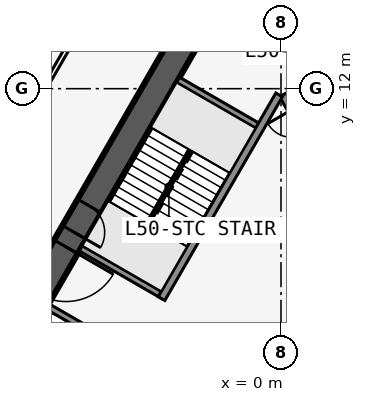
"""IFC4 building model, lengths in metres.
Left out: names, types, materials, properties, quantities, classifications, styles, units other than length and angle.
Written with IfcOpenShell. Run it as: python <this file> out.ifc"""

import sys

from ifc_helpers import new_model, si_unit, direction, frame, frame_2d, origin, place, context, subcontext, project, spatial, rectangle, extrude, element, fill, save


model = new_model("IFC4")
c1 = context("Model", 3, precision=1e-05, world=origin(), true_north=direction((0.0, 1.0)))
c2 = subcontext(c1, "Body", "Model", "MODEL_VIEW")
j1 = project(units=[si_unit("LENGTHUNIT", "METRE"), si_unit("PLANEANGLEUNIT", "RADIAN")], contexts=[c1])
p1 = place(None, origin())
s1 = spatial("IfcSite", under=j1, at=p1, CompositionType="ELEMENT")
p2 = place(p1, origin())
s2 = spatial("IfcBuilding", under=s1, at=p2, CompositionType="ELEMENT")
p3 = place(p2, frame((0.0, 0.0, 186.1)))
s3 = spatial("IfcBuildingStorey", under=s2, at=p3, CompositionType="ELEMENT", Elevation=186.1)
p4 = place(p3, frame((16.5, -9.526, 0.0), z_axis=(0.0, 0.0, 1.0), x_axis=(-0.499999749417, 0.866025548458, 0.0)))
e1 = element("IfcWall", 1, at=p4, inside=s3, PredefinedType="SHEAR", context=c2, shape_type="SweptSolid", body=[
    extrude(rectangle(XDim=33.0, YDim=0.9, at=frame_2d((16.5, 0.0))), origin(), (0.0, 0.0, 1.0), 3.4),
])
p5 = place(p4, frame((14.15, 0.0, 0.0)))
e2 = element("IfcOpeningElement", 2, at=p5, cuts=e1, PredefinedType="OPENING", context=c2, shape_type="SweptSolid", body=[
    extrude(rectangle(XDim=1.8, YDim=2.13, at=frame_2d((0.9, 1.065))), frame((0.0, 0.46, 0.0), z_axis=(0.0, -1.0, 0.0), x_axis=(1.0, 0.0, 0.0)), (0.0, 0.0, 1.0), 0.92),
])
p6 = place(p4, frame((12.6, 0.0, 0.0)))
e3 = element("IfcOpeningElement", 3, at=p6, cuts=e1, PredefinedType="OPENING", context=c2, shape_type="SweptSolid", body=[
    extrude(rectangle(XDim=1.0, YDim=2.13, at=frame_2d((0.5, 1.065))), frame((0.0, 0.46, 0.0), z_axis=(0.0, -1.0, 0.0), x_axis=(1.0, 0.0, 0.0)), (0.0, 0.0, 1.0), 0.92),
])
p7 = place(p3, frame((5.379, 2.586, 0.0), z_axis=(0.0, 0.0, 1.0), x_axis=(-0.500001375892, 0.866024609411, 0.0)))
e4 = element("IfcWall", 4, at=p7, inside=s3, PredefinedType="SOLIDWALL", context=c2, shape_type="SweptSolid", body=[
    extrude(rectangle(XDim=10.633, YDim=0.25, at=frame_2d((5.316, 0.0))), origin(), (0.0, 0.0, 1.0), 3.15),
])
p8 = place(p7, frame((9.164, 0.0, 0.0)))
e5 = element("IfcOpeningElement", 5, at=p8, cuts=e4, PredefinedType="OPENING", context=c2, shape_type="SweptSolid", body=[
    extrude(rectangle(XDim=0.9, YDim=2.13, at=frame_2d((0.45, 1.065))), frame((0.0, 0.135, 0.0), z_axis=(0.0, -1.0, 0.0), x_axis=(1.0, 0.0, 0.0)), (0.0, 0.0, 1.0), 0.27),
])
p9 = place(p7, frame((1.0, 0.0, 0.0)))
e6 = element("IfcOpeningElement", 6, at=p9, cuts=e4, PredefinedType="OPENING", context=c2, shape_type="SweptSolid", body=[
    extrude(rectangle(XDim=1.1, YDim=2.13, at=frame_2d((0.55, 1.065))), frame((0.0, 0.135, 0.0), z_axis=(0.0, -1.0, 0.0), x_axis=(1.0, 0.0, 0.0)), (0.0, 0.0, 1.0), 0.27),
])
p10 = place(p7, frame((3.9, 0.0, 0.0)))
e7 = element("IfcOpeningElement", 7, at=p10, cuts=e4, PredefinedType="OPENING", context=c2, shape_type="SweptSolid", body=[
    extrude(rectangle(XDim=1.1, YDim=2.13, at=frame_2d((0.55, 1.065))), frame((0.0, 0.135, 0.0), z_axis=(0.0, -1.0, 0.0), x_axis=(1.0, 0.0, 0.0)), (0.0, 0.0, 1.0), 0.27),
])
p11 = place(p7, frame((6.8, 0.0, 0.0)))
e8 = element("IfcOpeningElement", 8, at=p11, cuts=e4, PredefinedType="OPENING", context=c2, shape_type="SweptSolid", body=[
    extrude(rectangle(XDim=1.1, YDim=2.13, at=frame_2d((0.55, 1.065))), frame((0.0, 0.135, 0.0), z_axis=(0.0, -1.0, 0.0), x_axis=(1.0, 0.0, 0.0)), (0.0, 0.0, 1.0), 0.27),
])
p12 = place(p3, frame((0.0, 19.052, 0.0), z_axis=(0.0, 0.0, 1.0), x_axis=(-0.499999749417, -0.866025548458, 0.0)))
e9 = element("IfcWall", 9, at=p12, inside=s3, PredefinedType="SHEAR", context=c2, shape_type="SweptSolid", body=[
    extrude(rectangle(XDim=33.0, YDim=0.9, at=frame_2d((16.5, 0.0))), origin(), (0.0, 0.0, 1.0), 3.4),
])
p13 = place(p12, frame((14.15, 0.0, 0.0)))
e10 = element("IfcOpeningElement", 10, at=p13, cuts=e9, PredefinedType="OPENING", context=c2, shape_type="SweptSolid", body=[
    extrude(rectangle(XDim=1.8, YDim=2.13, at=frame_2d((0.9, 1.065))), frame((0.0, 0.46, 0.0), z_axis=(0.0, -1.0, 0.0), x_axis=(1.0, 0.0, 0.0)), (0.0, 0.0, 1.0), 0.92),
])
p14 = place(p12, frame((12.6, 0.0, 0.0)))
e11 = element("IfcOpeningElement", 11, at=p14, cuts=e9, PredefinedType="OPENING", context=c2, shape_type="SweptSolid", body=[
    extrude(rectangle(XDim=1.0, YDim=2.13, at=frame_2d((0.5, 1.065))), frame((0.0, 0.46, 0.0), z_axis=(0.0, -1.0, 0.0), x_axis=(1.0, 0.0, 0.0)), (0.0, 0.0, 1.0), 0.92),
])
p15 = place(p3, frame((-0.062, 11.794, 0.0), z_axis=(0.0, 0.0, 1.0), x_axis=(-0.500006680225, -0.86602154692, 0.0)))
e12 = element("IfcWall", 12, at=p15, inside=s3, PredefinedType="SOLIDWALL", context=c2, shape_type="SweptSolid", body=[
    extrude(rectangle(XDim=7.733, YDim=0.25, at=frame_2d((3.866, 0.0))), origin(), (0.0, 0.0, 1.0), 3.15),
])
for number, where, z_axis, x_axis in (
    (13, (-0.679, 10.727, 0.0), (0.0, 0.0, 1.0), (-0.866, 0.5, 0.0)),
    (14, (-3.879, 5.184, 0.0), (0.0, 0.0, 1.0), (-0.866, 0.5, 0.0)),
    (15, (-4.979, 3.279, 0.0), (0.0, 0.0, 1.0), (-0.866, 0.5, 0.0)),
):
    element("IfcWall", number, at=place(p3, frame(where, z_axis=z_axis, x_axis=x_axis)), inside=s3, PredefinedType="SOLIDWALL", context=c2, shape_type="SweptSolid", body=[
        extrude(rectangle(XDim=3.125, YDim=0.2, at=frame_2d((1.562, 0.0))), origin(), (0.0, 0.0, 1.0), 3.15),
    ])
p16 = place(p3, frame((-0.5, 24.636, 0.0), z_axis=(0.0, 0.0, 1.0), x_axis=(-0.500001915564, -0.86602429783, 0.0)))
e16 = element("IfcWall", 16, at=p16, inside=s3, PredefinedType="PARTITIONING", context=c2, shape_type="SweptSolid", body=[
    extrude(rectangle(XDim=42.172, YDim=0.15, at=frame_2d((21.086, 0.0))), origin(), (0.0, 0.0, 1.0), 3.15),
])
p17 = place(p16, frame((2.338, 0.0, 0.0)))
e17 = element("IfcOpeningElement", 17, at=p17, cuts=e16, PredefinedType="OPENING", context=c2, shape_type="SweptSolid", body=[
    extrude(rectangle(XDim=0.95, YDim=2.13, at=frame_2d((0.475, 1.065))), frame((0.0, 0.085, 0.0), z_axis=(0.0, -1.0, 0.0), x_axis=(1.0, 0.0, 0.0)), (0.0, 0.0, 1.0), 0.17),
])
p18 = place(p16, frame((18.111, 0.0, 0.0)))
e18 = element("IfcOpeningElement", 18, at=p18, cuts=e16, PredefinedType="OPENING", context=c2, shape_type="SweptSolid", body=[
    extrude(rectangle(XDim=0.95, YDim=2.13, at=frame_2d((0.475, 1.065))), frame((0.0, 0.085, 0.0), z_axis=(0.0, -1.0, 0.0), x_axis=(1.0, 0.0, 0.0)), (0.0, 0.0, 1.0), 0.17),
])
p19 = place(p16, frame((28.111, 0.0, 0.0)))
e19 = element("IfcOpeningElement", 19, at=p19, cuts=e16, PredefinedType="OPENING", context=c2, shape_type="SweptSolid", body=[
    extrude(rectangle(XDim=0.95, YDim=2.13, at=frame_2d((0.475, 1.065))), frame((0.0, 0.085, 0.0), z_axis=(0.0, -1.0, 0.0), x_axis=(1.0, 0.0, 0.0)), (0.0, 0.0, 1.0), 0.17),
])
p20 = place(p16, frame((39.311, 0.0, 0.0)))
e20 = element("IfcOpeningElement", 20, at=p20, cuts=e16, PredefinedType="OPENING", context=c2, shape_type="SweptSolid", body=[
    extrude(rectangle(XDim=0.95, YDim=2.13, at=frame_2d((0.475, 1.065))), frame((0.0, 0.085, 0.0), z_axis=(0.0, -1.0, 0.0), x_axis=(1.0, 0.0, 0.0)), (0.0, 0.0, 1.0), 0.17),
])
p21 = place(p3, frame((-2.988, 9.978, 0.0), z_axis=(0.0, 0.0, 1.0), x_axis=(-0.499992232847, -0.866029888106, 0.0)))
e21 = element("IfcWall", 21, at=p21, inside=s3, PredefinedType="SOLIDWALL", context=c2, shape_type="SweptSolid", body=[
    extrude(rectangle(XDim=2.794, YDim=0.1, at=frame_2d((1.397, 0.0))), origin(), (0.0, 0.0, 1.0), 3.4),
])
p22 = place(p13, origin())
e22 = element("IfcDoor", 22, at=p22, inside=s3, OperationType="DOUBLE_DOOR_SINGLE_SWING", PredefinedType="DOOR", context=c2, shape_type="SweptSolid", body=[
    extrude(rectangle(XDim=1.8, YDim=2.13, at=frame_2d((0.9, 1.065))), frame((0.0, 0.025, 0.0), z_axis=(0.0, -1.0, 0.0), x_axis=(1.0, 0.0, 0.0)), (0.0, 0.0, 1.0), 0.05),
])
fill(e10, e22)
p23 = place(p14, origin())
e23 = element("IfcDoor", 23, at=p23, inside=s3, OperationType="SINGLE_SWING_RIGHT", PredefinedType="DOOR", context=c2, shape_type="SweptSolid", body=[
    extrude(rectangle(XDim=1.0, YDim=2.13, at=frame_2d((0.5, 1.065))), frame((0.0, 0.025, 0.0), z_axis=(0.0, -1.0, 0.0), x_axis=(1.0, 0.0, 0.0)), (0.0, 0.0, 1.0), 0.05),
])
fill(e11, e23)
save(model, sys.argv[1])
